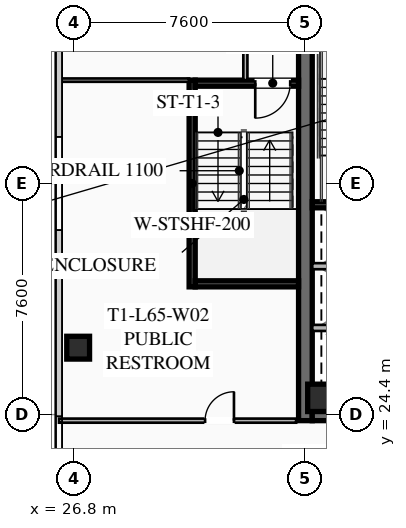
"""IFC4 building model, lengths in metres.
Left out: names, types, materials, properties, quantities, classifications, styles, units other than length and angle.
Written with IfcOpenShell. Run it as: python <this file> out.ifc"""

import sys

from ifc_helpers import new_model, si_unit, direction, frame, frame_2d, origin, origin_2d, place, context, subcontext, project, spatial, rectangle, hollow_rectangle, extrude, element, fill, save


model = new_model("IFC4")
c1 = context("Model", 3, precision=1e-05, world=origin(), true_north=direction((0.0, 1.0)))
c2 = subcontext(c1, "Body", "Model", "MODEL_VIEW")
j1 = project(units=[si_unit("LENGTHUNIT", "METRE"), si_unit("PLANEANGLEUNIT", "RADIAN")], contexts=[c1])
p1 = place(None, origin())
s1 = spatial("IfcSite", under=j1, at=p1, CompositionType="ELEMENT")
p2 = place(p1, origin())
s2 = spatial("IfcBuilding", under=s1, at=p2, CompositionType="ELEMENT")
p3 = place(p2, frame((0.0, 0.0, 239.7)))
s3 = spatial("IfcBuildingStorey", under=s2, at=p3, CompositionType="ELEMENT", Elevation=239.7)
p4 = place(p3, frame((34.425, 24.2, 0.0), z_axis=(0.0, 0.0, 1.0), x_axis=(0.0, 1.0, 0.0)))
e1 = element("IfcWall", 1, at=p4, inside=s3, PredefinedType="SHEAR", context=c2, shape_type="SweptSolid", body=[
    extrude(rectangle(XDim=15.6, YDim=0.45, at=frame_2d((7.8, 0.0))), origin(), (0.0, 0.0, 1.0), 3.55),
])
p5 = place(p3, frame((49.35, 24.425, 0.0), z_axis=(0.0, 0.0, 1.0), x_axis=(-1.0, 0.0, 0.0)))
e2 = element("IfcWall", 2, at=p5, inside=s3, PredefinedType="SHEAR", context=c2, shape_type="SweptSolid", body=[
    extrude(rectangle(XDim=14.7, YDim=0.45, at=frame_2d((7.35, 0.0))), origin(), (0.0, 0.0, 1.0), 3.55),
])
p6 = place(p5, frame((9.05, 0.0, 0.0)))
e3 = element("IfcOpeningElement", 3, at=p6, cuts=e2, PredefinedType="OPENING", context=c2, shape_type="SweptSolid", body=[
    extrude(rectangle(XDim=1.25, YDim=2.25, at=frame_2d((0.625, 1.125))), frame((0.0, 0.235, 0.0), z_axis=(0.0, -1.0, 0.0), x_axis=(1.0, 0.0, 0.0)), (0.0, 0.0, 1.0), 0.47),
])
p7 = place(p5, frame((4.0, 0.0, 0.0)))
e4 = element("IfcOpeningElement", 4, at=p7, cuts=e2, PredefinedType="OPENING", context=c2, shape_type="SweptSolid", body=[
    extrude(rectangle(XDim=1.25, YDim=2.25, at=frame_2d((0.625, 1.125))), frame((0.0, 0.235, 0.0), z_axis=(0.0, -1.0, 0.0), x_axis=(1.0, 0.0, 0.0)), (0.0, 0.0, 1.0), 0.47),
])
p8 = place(p3, frame((34.95, 24.95, 0.0), z_axis=(0.0, 0.0, 1.0), x_axis=(1.0, 0.0, 0.0)))
e5 = element("IfcColumn", 5, at=p8, inside=s3, PredefinedType="COLUMN", context=c2, shape_type="SweptSolid", body=[
    extrude(hollow_rectangle(XDim=0.9, YDim=0.9, WallThickness=0.04, at=origin_2d()), origin(), (0.0, 0.0, 1.0), 3.37),
])
p9 = place(p3, frame((26.95, 26.6, 0.0), z_axis=(0.0, 0.0, 1.0), x_axis=(1.0, 0.0, 0.0)))
e6 = element("IfcColumn", 6, at=p9, inside=s3, PredefinedType="COLUMN", context=c2, shape_type="SweptSolid", body=[
    extrude(hollow_rectangle(XDim=0.75, YDim=0.75, WallThickness=0.032, at=origin_2d()), origin(), (0.0, 0.0, 1.0), 3.37),
])
p10 = place(p3, frame((34.65, 31.3, 0.0), z_axis=(0.0, 0.0, 1.0), x_axis=(1.0, 0.0, 0.0)))
e7 = element("IfcWall", 7, at=p10, inside=s3, PredefinedType="SHEAR", context=c2, shape_type="SweptSolid", body=[
    extrude(rectangle(XDim=3.65, YDim=0.2, at=frame_2d((1.825, 0.0))), origin(), (0.0, 0.0, 1.0), 3.37),
])
for number, where, z_axis, x_axis in (
    (8, (34.65, 27.25, 0.0), (0.0, 0.0, 1.0), (1.0, 0.0, 0.0)),
    (9, (34.65, 29.28, 0.0), (0.0, 0.0, 1.0), (1.0, 0.0, 0.0)),
):
    element("IfcWall", number, at=place(p3, frame(where, z_axis=z_axis, x_axis=x_axis)), inside=s3, PredefinedType="SOLIDWALL", context=c2, shape_type="SweptSolid", body=[
        extrude(rectangle(XDim=3.3, YDim=0.2, at=frame_2d((1.65, 0.0))), origin(), (0.0, 0.0, 1.0), 3.37),
    ])
p11 = place(p3, frame((30.7, 28.6, 0.0), z_axis=(0.0, 0.0, 1.0), x_axis=(0.0, 1.0, 0.0)))
e10 = element("IfcWall", 10, at=p11, inside=s3, PredefinedType="SHEAR", context=c2, shape_type="SweptSolid", body=[
    extrude(rectangle(XDim=6.8, YDim=0.2, at=frame_2d((3.4, 0.0))), origin(), (0.0, 0.0, 1.0), 3.37),
])
p12 = place(p3, frame((34.2, 35.3, 0.0), z_axis=(0.0, 0.0, 1.0), x_axis=(-1.0, 0.0, 0.0)))
e11 = element("IfcWall", 11, at=p12, inside=s3, PredefinedType="SHEAR", context=c2, shape_type="SweptSolid", body=[
    extrude(rectangle(XDim=3.4, YDim=0.2, at=frame_2d((1.7, 0.0))), origin(), (0.0, 0.0, 1.0), 3.37),
])
p13 = place(p12, frame((0.275, 0.0, 0.0)))
e12 = element("IfcOpeningElement", 12, at=p13, cuts=e11, PredefinedType="OPENING", context=c2, shape_type="SweptSolid", body=[
    extrude(rectangle(XDim=1.15, YDim=2.2, at=frame_2d((0.575, 1.1))), frame((0.0, 0.11, 0.0), z_axis=(0.0, -1.0, 0.0), x_axis=(1.0, 0.0, 0.0)), (0.0, 0.0, 1.0), 0.22),
])
p14 = place(p3, frame((30.8, 28.7, 0.0), z_axis=(0.0, 0.0, 1.0), x_axis=(1.0, 0.0, 0.0)))
e13 = element("IfcWall", 13, at=p14, inside=s3, PredefinedType="SHEAR", context=c2, shape_type="SweptSolid", body=[
    extrude(rectangle(XDim=3.4, YDim=0.2, at=frame_2d((1.7, 0.0))), origin(), (0.0, 0.0, 1.0), 3.37),
])
p15 = place(p3, frame((32.45, 35.4, 0.0), z_axis=(0.0, 0.0, 1.0), x_axis=(0.0, 1.0, 0.0)))
e14 = element("IfcWall", 14, at=p15, inside=s3, PredefinedType="PARTITIONING", context=c2, shape_type="SweptSolid", body=[
    extrude(rectangle(XDim=4.4, YDim=0.135, at=frame_2d((2.2, 0.0))), origin(), (0.0, 0.0, 1.0), 2.723),
])
p16 = place(p3, frame((26.32, 24.2, 0.0), z_axis=(0.0, 0.0, 1.0), x_axis=(1.0, 0.0, 0.0)))
e15 = element("IfcWall", 15, at=p16, inside=s3, PredefinedType="PARTITIONING", context=c2, shape_type="SweptSolid", body=[
    extrude(rectangle(XDim=7.8, YDim=0.135, at=frame_2d((3.9, 0.0))), origin(), (0.0, 0.0, 1.0), 2.723),
])
p17 = place(p16, frame((4.805, 0.0, 0.0)))
e16 = element("IfcOpeningElement", 16, at=p17, cuts=e15, PredefinedType="OPENING", context=c2, shape_type="SweptSolid", body=[
    extrude(rectangle(XDim=0.95, YDim=2.05, at=frame_2d((0.475, 1.025))), frame((0.0, 0.077, 0.0), z_axis=(0.0, -1.0, 0.0), x_axis=(1.0, 0.0, 0.0)), (0.0, 0.0, 1.0), 0.155),
])
p18 = place(p3, frame((30.6, 35.4, 0.0), z_axis=(0.0, 0.0, 1.0), x_axis=(-1.0, 0.0, 0.0)))
e17 = element("IfcWall", 17, at=p18, inside=s3, PredefinedType="PARTITIONING", context=c2, shape_type="SweptSolid", body=[
    extrude(rectangle(XDim=4.28, YDim=0.11, at=frame_2d((2.14, 0.0))), origin(), (0.0, 0.0, 1.0), 2.723),
])
p19 = place(p13, origin())
e18 = element("IfcDoor", 18, at=p19, inside=s3, OperationType="SINGLE_SWING_RIGHT", PredefinedType="DOOR", context=c2, shape_type="SweptSolid", body=[
    extrude(rectangle(XDim=1.15, YDim=2.2, at=frame_2d((0.575, 1.1))), frame((0.0, 0.025, 0.0), z_axis=(0.0, -1.0, 0.0), x_axis=(1.0, 0.0, 0.0)), (0.0, 0.0, 1.0), 0.05),
])
fill(e12, e18)
p20 = place(p17, origin())
e19 = element("IfcDoor", 19, at=p20, inside=s3, OperationType="SINGLE_SWING_RIGHT", PredefinedType="DOOR", context=c2, shape_type="SweptSolid", body=[
    extrude(rectangle(XDim=0.95, YDim=2.05, at=frame_2d((0.475, 1.025))), frame((0.0, 0.025, 0.0), z_axis=(0.0, -1.0, 0.0), x_axis=(1.0, 0.0, 0.0)), (0.0, 0.0, 1.0), 0.05),
])
fill(e16, e19)
save(model, sys.argv[1])
